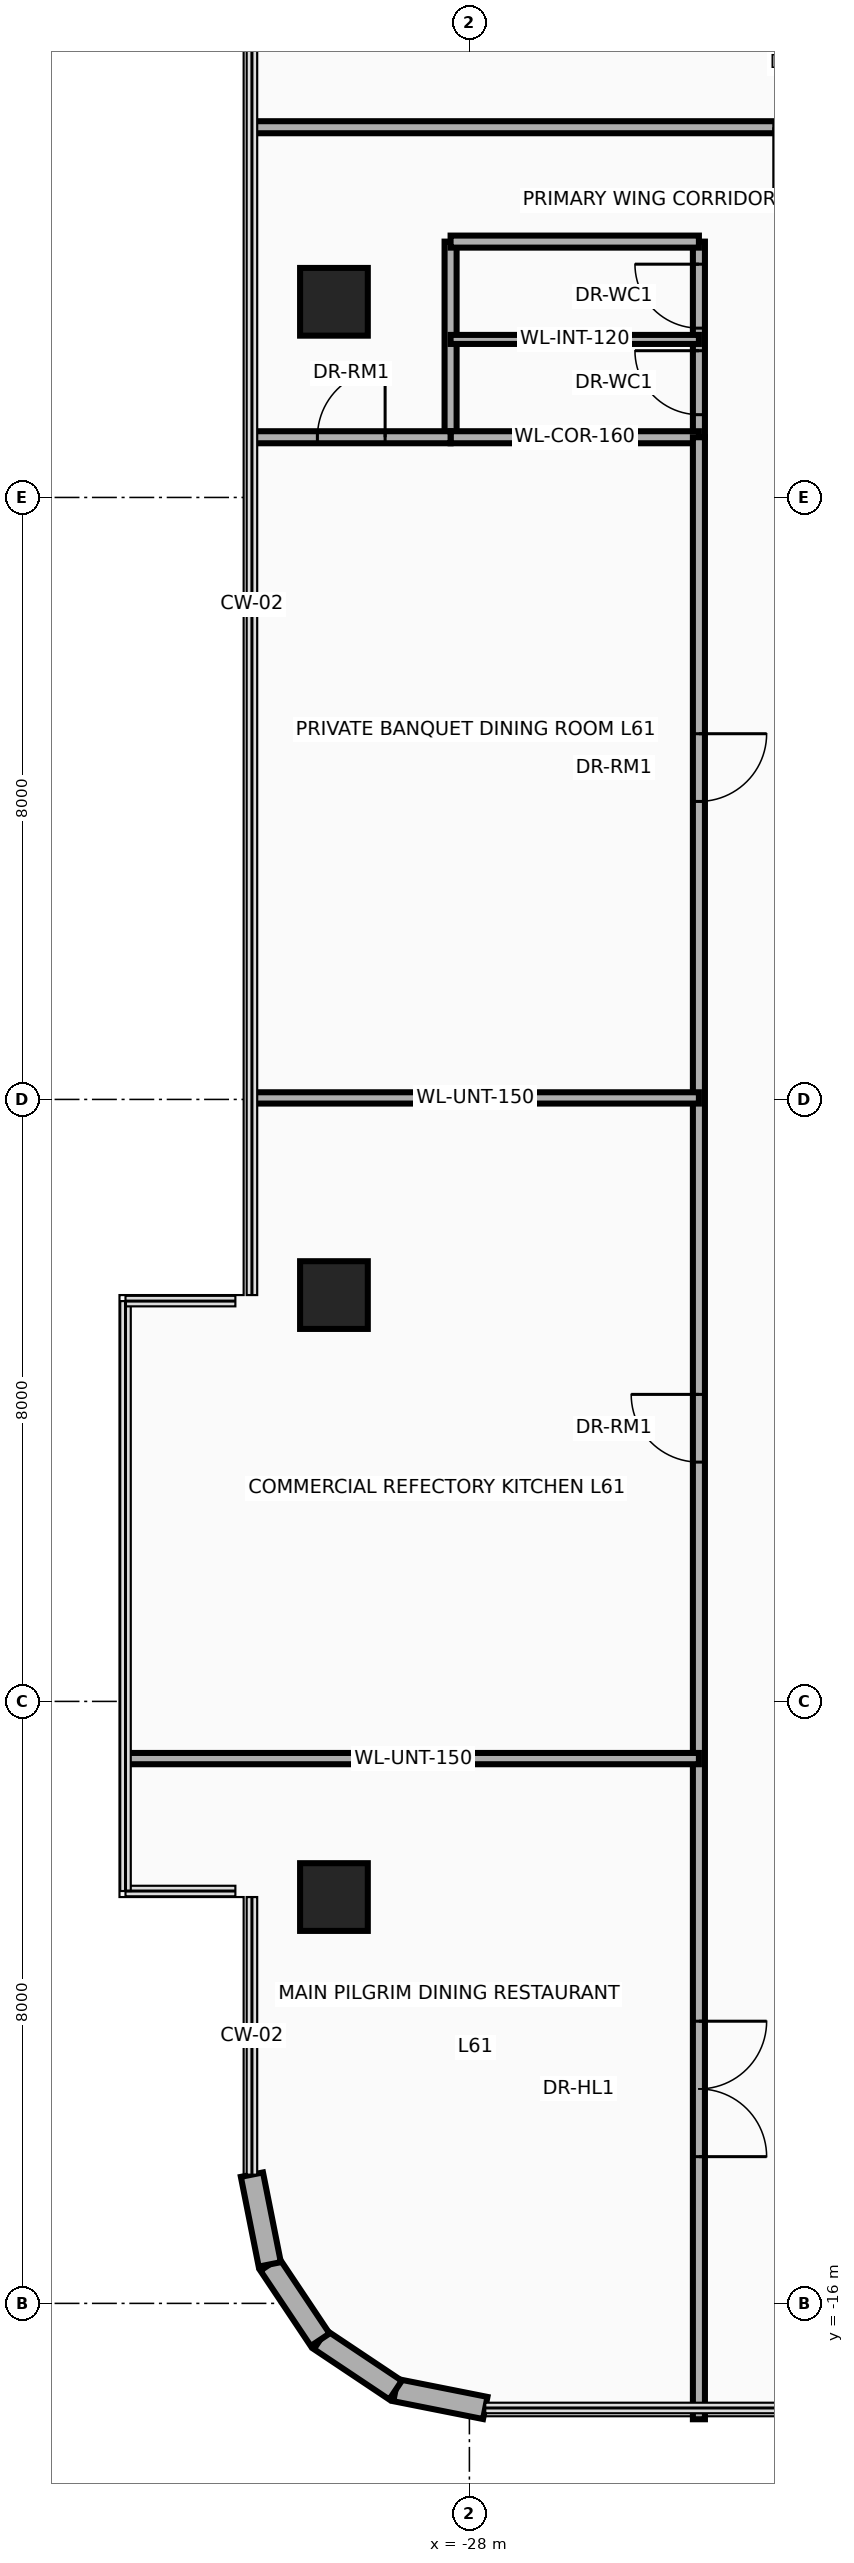
"""IFC4 building model, lengths in metres.
Left out: names, types, materials, properties, quantities, classifications, styles, units other than length and angle.
Written with IfcOpenShell. Run it as: python <this file> out.ifc"""

import sys

from ifc_helpers import new_model, si_unit, direction, frame, frame_2d, origin, origin_2d, place, context, subcontext, project, spatial, rectangle, extrude, source, transform, mapped, element, fill, save


model = new_model("IFC4")
c1 = context("Model", 3, precision=1e-05, world=origin(), true_north=direction((0.0, 1.0)))
c2 = subcontext(c1, "Body", "Model", "MODEL_VIEW")
j1 = project(units=[si_unit("LENGTHUNIT", "METRE"), si_unit("PLANEANGLEUNIT", "RADIAN")], contexts=[c1])
p1 = place(None, origin())
s1 = spatial("IfcSite", under=j1, at=p1, CompositionType="ELEMENT")
p2 = place(p1, origin())
s2 = spatial("IfcBuilding", under=s1, at=p2, CompositionType="ELEMENT")
p3 = place(p2, frame((0.0, 0.0, 237.0)))
s3 = spatial("IfcBuildingStorey", under=s2, at=p3, CompositionType="ELEMENT", Elevation=237.0)
m1 = source(origin(), c2, "Body", "SweptSolid", [
    extrude(rectangle(XDim=0.9, YDim=0.9, at=origin_2d()), origin(), (0.0, 0.0, 1.0), 3.5),
])
for number, where, z_axis, x_axis in (
    (1, (-29.8, -10.6, 0.0), (0.0, 0.0, 1.0), (1.0, 0.0, 0.0)),
    (2, (-29.8, -2.6, 0.0), (0.0, 0.0, 1.0), (1.0, 0.0, 0.0)),
    (3, (-29.8, 10.6, 0.0), (0.0, 0.0, 1.0), (1.0, 0.0, 0.0)),
):
    element("IfcColumn", number, at=place(p3, frame(where, z_axis=z_axis, x_axis=x_axis)), inside=s3, PredefinedType="COLUMN", context=c2, shape_type="MappedRepresentation", body=[
        mapped(m1, transform((0.0, 0.0, 0.0), x_axis=(1.0, 0.0, 0.0), y_axis=(0.0, 1.0, 0.0), z_axis=(0.0, 0.0, 1.0), scale=1.0)),
    ])
p4 = place(p3, frame((-27.789, -17.39, 0.0), z_axis=(0.0, 0.0, 1.0), x_axis=(-0.980804027463, 0.194996050505, 0.0)))
e4 = element("IfcWall", 4, at=p4, inside=s3, PredefinedType="SOLIDWALL", context=c2, shape_type="SweptSolid", body=[
    extrude(rectangle(XDim=1.216, YDim=0.3, at=frame_2d((0.608, 0.0))), origin(), (0.0, 0.0, 1.0), 3.26),
])
for number, where, z_axis, x_axis in (
    (5, (-28.982, -17.153, 0.0), (0.0, 0.0, 1.0), (-0.831, 0.556, 0.0)),
    (6, (-29.983, -16.483, 0.0), (0.0, 0.0, 1.0), (-0.556, 0.831, 0.0)),
):
    element("IfcWall", number, at=place(p3, frame(where, z_axis=z_axis, x_axis=x_axis)), inside=s3, PredefinedType="SOLIDWALL", context=c2, shape_type="SweptSolid", body=[
        extrude(rectangle(XDim=1.205, YDim=0.3, at=frame_2d((0.603, 0.0))), origin(), (0.0, 0.0, 1.0), 3.26),
    ])
p5 = place(p3, frame((-30.653, -15.482, 0.0), z_axis=(0.0, 0.0, 1.0), x_axis=(-0.194996050505, 0.980804027463, 0.0)))
e7 = element("IfcWall", 7, at=p5, inside=s3, PredefinedType="SOLIDWALL", context=c2, shape_type="SweptSolid", body=[
    extrude(rectangle(XDim=1.216, YDim=0.3, at=frame_2d((0.608, 0.0))), origin(), (0.0, 0.0, 1.0), 3.26),
])
p6 = place(p3, frame((-28.25, 8.8, 0.0), z_axis=(0.0, 0.0, 1.0), x_axis=(0.0, 1.0, 0.0)))
e8 = element("IfcWall", 8, at=p6, inside=s3, PredefinedType="PARTITIONING", context=c2, shape_type="SweptSolid", body=[
    extrude(rectangle(XDim=2.6, YDim=0.16, at=frame_2d((1.3, 0.0))), origin(), (0.0, 0.0, 1.0), 2.544),
])
p7 = place(p3, frame((-24.95, 8.8, 0.0), z_axis=(0.0, 0.0, 1.0), x_axis=(0.0, 1.0, 0.0)))
e9 = element("IfcWall", 9, at=p7, inside=s3, PredefinedType="PARTITIONING", context=c2, shape_type="SweptSolid", body=[
    extrude(rectangle(XDim=2.6, YDim=0.16, at=frame_2d((1.3, 0.0))), origin(), (0.0, 0.0, 1.0), 2.544),
])
p8 = place(p7, frame((0.3, 0.0, 0.0)))
e10 = element("IfcOpeningElement", 10, at=p8, cuts=e9, PredefinedType="OPENING", context=c2, shape_type="SweptSolid", body=[
    extrude(rectangle(XDim=0.85, YDim=2.1, at=frame_2d((0.425, 1.05))), frame((0.0, 0.095, 0.0), z_axis=(0.0, -1.0, 0.0), x_axis=(1.0, 0.0, 0.0)), (0.0, 0.0, 1.0), 0.19),
])
p9 = place(p7, frame((1.45, 0.0, 0.0)))
e11 = element("IfcOpeningElement", 11, at=p9, cuts=e9, PredefinedType="OPENING", context=c2, shape_type="SweptSolid", body=[
    extrude(rectangle(XDim=0.85, YDim=2.1, at=frame_2d((0.425, 1.05))), frame((0.0, 0.095, 0.0), z_axis=(0.0, -1.0, 0.0), x_axis=(1.0, 0.0, 0.0)), (0.0, 0.0, 1.0), 0.19),
])
for number, where, z_axis, x_axis in (
    (12, (-28.25, 8.8, 0.0), (0.0, 0.0, 1.0), (1.0, 0.0, 0.0)),
    (13, (-28.25, 11.4, 0.0), (0.0, 0.0, 1.0), (1.0, 0.0, 0.0)),
):
    element("IfcWall", number, at=place(p3, frame(where, z_axis=z_axis, x_axis=x_axis)), inside=s3, PredefinedType="PARTITIONING", context=c2, shape_type="SweptSolid", body=[
        extrude(rectangle(XDim=3.3, YDim=0.16, at=frame_2d((1.65, 0.0))), origin(), (0.0, 0.0, 1.0), 3.26),
    ])
p10 = place(p3, frame((-28.25, 10.1, 0.0), z_axis=(0.0, 0.0, 1.0), x_axis=(1.0, 0.0, 0.0)))
e14 = element("IfcWall", 14, at=p10, inside=s3, PredefinedType="PARTITIONING", context=c2, shape_type="SweptSolid", body=[
    extrude(rectangle(XDim=3.3, YDim=0.12, at=frame_2d((1.65, 0.0))), origin(), (0.0, 0.0, 1.0), 3.26),
])
p11 = place(p3, frame((-24.95, -17.54, 0.0), z_axis=(0.0, 0.0, 1.0), x_axis=(0.0, 1.0, 0.0)))
e15 = element("IfcWall", 15, at=p11, inside=s3, PredefinedType="PARTITIONING", context=c2, shape_type="SweptSolid", body=[
    extrude(rectangle(XDim=26.34, YDim=0.16, at=frame_2d((13.17, 0.0))), origin(), (0.0, 0.0, 1.0), 2.544),
])
p12 = place(p11, frame((3.49, 0.0, 0.0)))
e16 = element("IfcOpeningElement", 16, at=p12, cuts=e15, PredefinedType="OPENING", context=c2, shape_type="SweptSolid", body=[
    extrude(rectangle(XDim=1.8, YDim=2.15, at=frame_2d((0.9, 1.075))), frame((0.0, 0.095, 0.0), z_axis=(0.0, -1.0, 0.0), x_axis=(1.0, 0.0, 0.0)), (0.0, 0.0, 1.0), 0.19),
])
p13 = place(p11, frame((12.72, 0.0, 0.0)))
e17 = element("IfcOpeningElement", 17, at=p13, cuts=e15, PredefinedType="OPENING", context=c2, shape_type="SweptSolid", body=[
    extrude(rectangle(XDim=0.9, YDim=2.1, at=frame_2d((0.45, 1.05))), frame((0.0, 0.095, 0.0), z_axis=(0.0, -1.0, 0.0), x_axis=(1.0, 0.0, 0.0)), (0.0, 0.0, 1.0), 0.19),
])
p14 = place(p11, frame((21.5, 0.0, 0.0)))
e18 = element("IfcOpeningElement", 18, at=p14, cuts=e15, PredefinedType="OPENING", context=c2, shape_type="SweptSolid", body=[
    extrude(rectangle(XDim=0.9, YDim=2.1, at=frame_2d((0.45, 1.05))), frame((0.0, 0.095, 0.0), z_axis=(0.0, -1.0, 0.0), x_axis=(1.0, 0.0, 0.0)), (0.0, 0.0, 1.0), 0.19),
])
p15 = place(p3, frame((-30.89, 8.8, 0.0), z_axis=(0.0, 0.0, 1.0), x_axis=(1.0, 0.0, 0.0)))
e19 = element("IfcWall", 19, at=p15, inside=s3, PredefinedType="PARTITIONING", context=c2, shape_type="SweptSolid", body=[
    extrude(rectangle(XDim=2.64, YDim=0.16, at=frame_2d((1.32, 0.0))), origin(), (0.0, 0.0, 1.0), 2.706),
])
p16 = place(p15, frame((0.87, 0.0, 0.0)))
e20 = element("IfcOpeningElement", 20, at=p16, cuts=e19, PredefinedType="OPENING", context=c2, shape_type="SweptSolid", body=[
    extrude(rectangle(XDim=0.9, YDim=2.1, at=frame_2d((0.45, 1.05))), frame((0.0, 0.095, 0.0), z_axis=(0.0, -1.0, 0.0), x_axis=(1.0, 0.0, 0.0)), (0.0, 0.0, 1.0), 0.19),
])
p17 = place(p3, frame((-32.54, -8.76, 0.0), z_axis=(0.0, 0.0, 1.0), x_axis=(1.0, 0.0, 0.0)))
e21 = element("IfcWall", 21, at=p17, inside=s3, PredefinedType="PARTITIONING", context=c2, shape_type="SweptSolid", body=[
    extrude(rectangle(XDim=7.59, YDim=0.15, at=frame_2d((3.795, 0.0))), origin(), (0.0, 0.0, 1.0), 2.706),
])
p18 = place(p3, frame((-30.89, 0.02, 0.0), z_axis=(0.0, 0.0, 1.0), x_axis=(1.0, 0.0, 0.0)))
e22 = element("IfcWall", 22, at=p18, inside=s3, PredefinedType="PARTITIONING", context=c2, shape_type="SweptSolid", body=[
    extrude(rectangle(XDim=5.94, YDim=0.15, at=frame_2d((2.97, 0.0))), origin(), (0.0, 0.0, 1.0), 2.706),
])
p19 = place(p3, frame((-30.89, 12.92, 0.0), z_axis=(0.0, 0.0, 1.0), x_axis=(1.0, 0.0, 0.0)))
e23 = element("IfcWall", 23, at=p19, inside=s3, PredefinedType="PARTITIONING", context=c2, shape_type="SweptSolid", body=[
    extrude(rectangle(XDim=31.28, YDim=0.16, at=frame_2d((15.64, 0.0))), origin(), (0.0, 0.0, 1.0), 2.634),
])
p20 = place(p19, frame((6.935, 0.0, 0.0)))
e24 = element("IfcOpeningElement", 24, at=p20, cuts=e23, PredefinedType="OPENING", context=c2, shape_type="SweptSolid", body=[
    extrude(rectangle(XDim=0.9, YDim=2.1, at=frame_2d((0.45, 1.05))), frame((0.0, 0.095, 0.0), z_axis=(0.0, -1.0, 0.0), x_axis=(1.0, 0.0, 0.0)), (0.0, 0.0, 1.0), 0.19),
])
p21 = place(p19, frame((22.575, 0.0, 0.0)))
e25 = element("IfcOpeningElement", 25, at=p21, cuts=e23, PredefinedType="OPENING", context=c2, shape_type="SweptSolid", body=[
    extrude(rectangle(XDim=0.9, YDim=2.1, at=frame_2d((0.45, 1.05))), frame((0.0, 0.095, 0.0), z_axis=(0.0, -1.0, 0.0), x_axis=(1.0, 0.0, 0.0)), (0.0, 0.0, 1.0), 0.19),
])
p22 = place(p8, origin())
e26 = element("IfcDoor", 26, at=p22, inside=s3, OperationType="SINGLE_SWING_RIGHT", PredefinedType="DOOR", context=c2, shape_type="SweptSolid", body=[
    extrude(rectangle(XDim=0.85, YDim=2.1, at=frame_2d((0.425, 1.05))), frame((0.0, 0.025, 0.0), z_axis=(0.0, -1.0, 0.0), x_axis=(1.0, 0.0, 0.0)), (0.0, 0.0, 1.0), 0.05),
])
fill(e10, e26)
p23 = place(p9, origin())
e27 = element("IfcDoor", 27, at=p23, inside=s3, OperationType="SINGLE_SWING_LEFT", PredefinedType="DOOR", context=c2, shape_type="SweptSolid", body=[
    extrude(rectangle(XDim=0.85, YDim=2.1, at=frame_2d((0.425, 1.05))), frame((0.0, 0.025, 0.0), z_axis=(0.0, -1.0, 0.0), x_axis=(1.0, 0.0, 0.0)), (0.0, 0.0, 1.0), 0.05),
])
fill(e11, e27)
p24 = place(p16, origin())
e28 = element("IfcDoor", 28, at=p24, inside=s3, OperationType="SINGLE_SWING_RIGHT", PredefinedType="DOOR", context=c2, shape_type="SweptSolid", body=[
    extrude(rectangle(XDim=0.9, YDim=2.1, at=frame_2d((0.45, 1.05))), frame((0.0, 0.025, 0.0), z_axis=(0.0, -1.0, 0.0), x_axis=(1.0, 0.0, 0.0)), (0.0, 0.0, 1.0), 0.05),
])
fill(e20, e28)
p25 = place(p12, frame((1.8, 0.0, 0.0), z_axis=(0.0, 0.0, 1.0), x_axis=(-1.0, 0.0, 0.0)))
e29 = element("IfcDoor", 29, at=p25, inside=s3, OperationType="DOUBLE_DOOR_SINGLE_SWING", PredefinedType="DOOR", context=c2, shape_type="SweptSolid", body=[
    extrude(rectangle(XDim=1.8, YDim=2.15, at=frame_2d((0.9, 1.075))), frame((0.0, 0.025, 0.0), z_axis=(0.0, -1.0, 0.0), x_axis=(1.0, 0.0, 0.0)), (0.0, 0.0, 1.0), 0.05),
])
fill(e16, e29)
p26 = place(p13, origin())
e30 = element("IfcDoor", 30, at=p26, inside=s3, OperationType="SINGLE_SWING_RIGHT", PredefinedType="DOOR", context=c2, shape_type="SweptSolid", body=[
    extrude(rectangle(XDim=0.9, YDim=2.1, at=frame_2d((0.45, 1.05))), frame((0.0, 0.025, 0.0), z_axis=(0.0, -1.0, 0.0), x_axis=(1.0, 0.0, 0.0)), (0.0, 0.0, 1.0), 0.05),
])
fill(e17, e30)
p27 = place(p14, frame((0.9, 0.0, 0.0), z_axis=(0.0, 0.0, 1.0), x_axis=(-1.0, 0.0, 0.0)))
e31 = element("IfcDoor", 31, at=p27, inside=s3, OperationType="SINGLE_SWING_LEFT", PredefinedType="DOOR", context=c2, shape_type="SweptSolid", body=[
    extrude(rectangle(XDim=0.9, YDim=2.1, at=frame_2d((0.45, 1.05))), frame((0.0, 0.025, 0.0), z_axis=(0.0, -1.0, 0.0), x_axis=(1.0, 0.0, 0.0)), (0.0, 0.0, 1.0), 0.05),
])
fill(e18, e31)
p28 = place(p20, frame((0.9, 0.0, 0.0), z_axis=(0.0, 0.0, 1.0), x_axis=(-1.0, 0.0, 0.0)))
e32 = element("IfcDoor", 32, at=p28, inside=s3, OperationType="SINGLE_SWING_LEFT", PredefinedType="DOOR", context=c2, shape_type="SweptSolid", body=[
    extrude(rectangle(XDim=0.9, YDim=2.1, at=frame_2d((0.45, 1.05))), frame((0.0, 0.025, 0.0), z_axis=(0.0, -1.0, 0.0), x_axis=(1.0, 0.0, 0.0)), (0.0, 0.0, 1.0), 0.05),
])
fill(e24, e32)
save(model, sys.argv[1])
